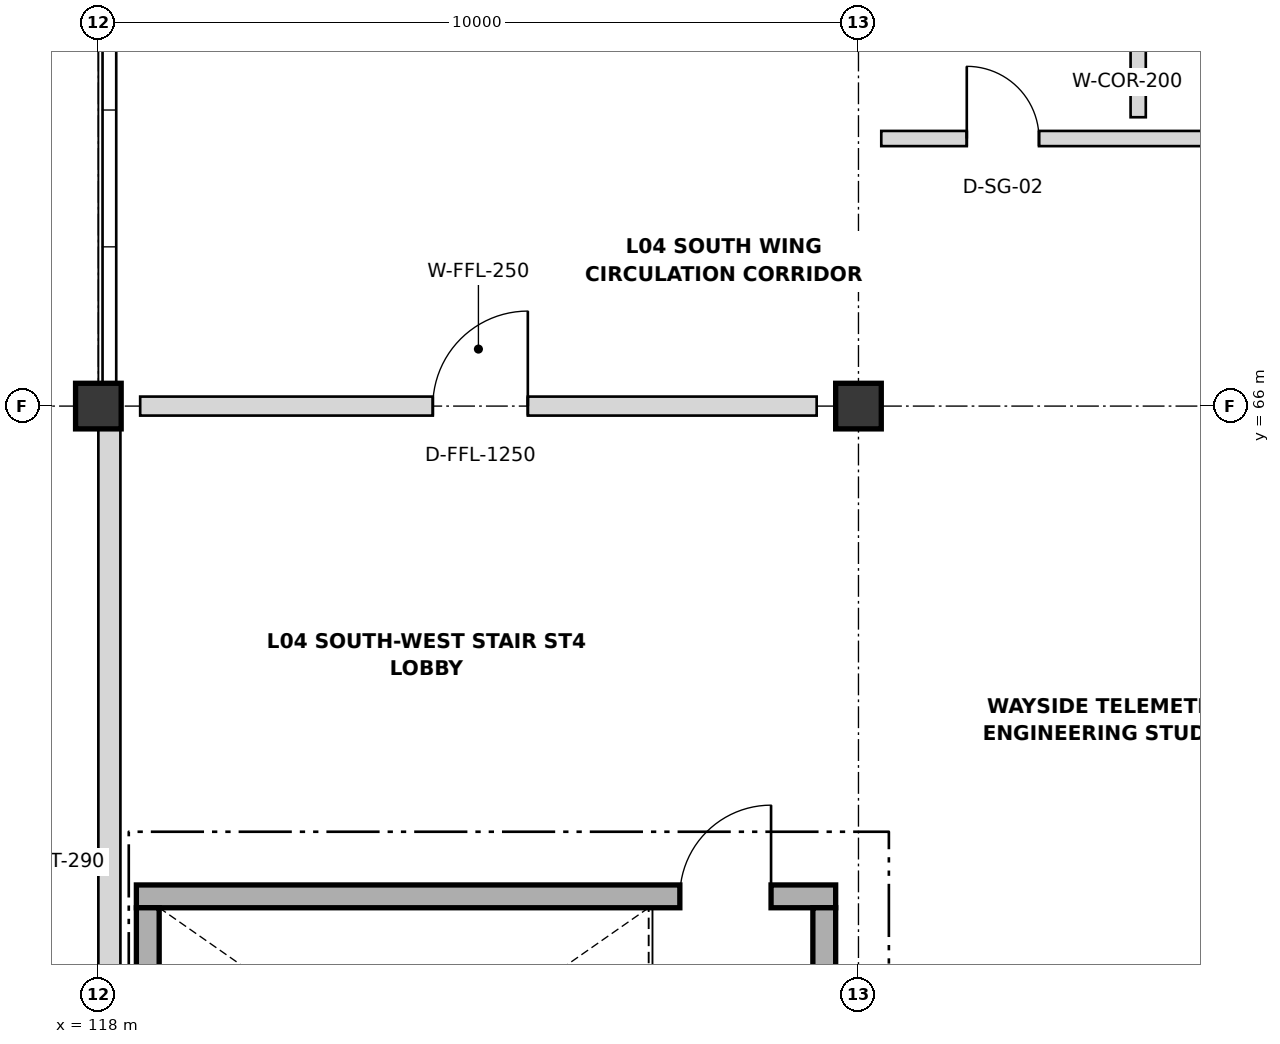
"""IFC4 building model, lengths in metres.
Left out: names, types, materials, properties, quantities, classifications, styles, units other than length and angle.
Written with IfcOpenShell. Run it as: python <this file> out.ifc"""

import sys

from ifc_helpers import new_model, si_unit, direction, frame, frame_2d, origin, origin_2d, place, context, subcontext, project, spatial, rectangle, extrude, element, fill, save


model = new_model("IFC4")
c1 = context("Model", 3, precision=1e-05, world=origin(), true_north=direction((0.0, 1.0)))
c2 = subcontext(c1, "Body", "Model", "MODEL_VIEW")
j1 = project(units=[si_unit("LENGTHUNIT", "METRE"), si_unit("PLANEANGLEUNIT", "RADIAN")], contexts=[c1])
p1 = place(None, origin())
s1 = spatial("IfcSite", under=j1, at=p1, CompositionType="ELEMENT")
p2 = place(p1, origin())
s2 = spatial("IfcBuilding", under=s1, at=p2, CompositionType="ELEMENT")
p3 = place(p2, frame((0.0, 0.0, 18.6)))
s3 = spatial("IfcBuildingStorey", under=s2, at=p3, CompositionType="ELEMENT", Elevation=18.6)
for number, where, z_axis, x_axis in (
    (1, (118.0, 66.0, 0.0), (0.0, 0.0, 1.0), (1.0, 0.0, 0.0)),
    (2, (128.0, 66.0, 0.0), (0.0, 0.0, 1.0), (1.0, 0.0, 0.0)),
):
    element("IfcColumn", number, at=place(p3, frame(where, z_axis=z_axis, x_axis=x_axis)), inside=s3, PredefinedType="COLUMN", context=c2, shape_type="SweptSolid", body=[
        extrude(rectangle(XDim=0.6, YDim=0.6, at=origin_2d()), origin(), (0.0, 0.0, 1.0), 4.2),
    ])
p4 = place(p3, frame((118.145, 54.295, 0.0), z_axis=(0.0, 0.0, 1.0), x_axis=(0.0, 1.0, 0.0)))
e3 = element("IfcWall", 3, at=p4, inside=s3, PredefinedType="SOLIDWALL", context=c2, shape_type="SweptSolid", body=[
    extrude(rectangle(XDim=11.41, YDim=0.29, at=frame_2d((5.705, 0.0))), origin(), (0.0, 0.0, 1.0), 3.188),
])
p5 = place(p3, frame((118.5, 59.55, 0.0), z_axis=(0.0, 0.0, 1.0), x_axis=(1.0, 0.0, 0.0)))
e4 = element("IfcWall", 4, at=p5, inside=s3, PredefinedType="SHEAR", context=c2, shape_type="SweptSolid", body=[
    extrude(rectangle(XDim=9.2, YDim=0.3, at=frame_2d((4.6, 0.0))), origin(), (0.0, 0.0, 1.0), 3.95),
])
p6 = place(p5, frame((7.15, 0.0, 0.0)))
e5 = element("IfcOpeningElement", 5, at=p6, cuts=e4, PredefinedType="OPENING", context=c2, shape_type="SweptSolid", body=[
    extrude(rectangle(XDim=1.2, YDim=2.15, at=frame_2d((0.6, 1.075))), frame((0.0, 0.16, 0.0), z_axis=(0.0, -1.0, 0.0), x_axis=(1.0, 0.0, 0.0)), (0.0, 0.0, 1.0), 0.32),
])
for number, where, z_axis, x_axis in (
    (6, (127.55, 59.4, 0.0), (0.0, 0.0, 1.0), (0.0, -1.0, 0.0)),
    (7, (118.65, 54.9, 0.0), (0.0, 0.0, 1.0), (0.0, 1.0, 0.0)),
):
    element("IfcWall", number, at=place(p3, frame(where, z_axis=z_axis, x_axis=x_axis)), inside=s3, PredefinedType="SHEAR", context=c2, shape_type="SweptSolid", body=[
        extrude(rectangle(XDim=4.5, YDim=0.3, at=frame_2d((2.25, 0.0))), origin(), (0.0, 0.0, 1.0), 3.95),
    ])
p7 = place(p3, frame((118.55, 66.0, 0.0), z_axis=(0.0, 0.0, 1.0), x_axis=(1.0, 0.0, 0.0)))
e8 = element("IfcWall", 8, at=p7, inside=s3, PredefinedType="PARTITIONING", context=c2, shape_type="SweptSolid", body=[
    extrude(rectangle(XDim=8.9, YDim=0.25, at=frame_2d((4.45, 0.0))), origin(), (0.0, 0.0, 1.0), 3.288),
])
p8 = place(p7, frame((3.85, 0.0, 0.0)))
e9 = element("IfcOpeningElement", 9, at=p8, cuts=e8, PredefinedType="OPENING", context=c2, shape_type="SweptSolid", body=[
    extrude(rectangle(XDim=1.25, YDim=2.15, at=frame_2d((0.625, 1.075))), frame((0.0, 0.135, 0.0), z_axis=(0.0, -1.0, 0.0), x_axis=(1.0, 0.0, 0.0)), (0.0, 0.0, 1.0), 0.27),
])
p9 = place(p3, frame((128.3, 69.52, 0.0), z_axis=(0.0, 0.0, 1.0), x_axis=(1.0, 0.0, 0.0)))
e10 = element("IfcWall", 10, at=p9, inside=s3, PredefinedType="PARTITIONING", context=c2, shape_type="SweptSolid", body=[
    extrude(rectangle(XDim=9.4, YDim=0.2, at=frame_2d((4.7, 0.0))), origin(), (0.0, 0.0, 1.0), 3.188),
])
p10 = place(p9, frame((1.125, 0.0, 0.0)))
e11 = element("IfcOpeningElement", 11, at=p10, cuts=e10, PredefinedType="OPENING", context=c2, shape_type="SweptSolid", body=[
    extrude(rectangle(XDim=0.95, YDim=2.1, at=frame_2d((0.475, 1.05))), frame((0.0, 0.11, 0.0), z_axis=(0.0, -1.0, 0.0), x_axis=(1.0, 0.0, 0.0)), (0.0, 0.0, 1.0), 0.22),
])
p11 = place(p3, frame((131.68, 69.8, 0.0), z_axis=(0.0, 0.0, 1.0), x_axis=(0.0, 1.0, 0.0)))
e12 = element("IfcWall", 12, at=p11, inside=s3, PredefinedType="PARTITIONING", context=c2, shape_type="SweptSolid", body=[
    extrude(rectangle(XDim=7.9, YDim=0.2, at=frame_2d((3.95, 0.0))), origin(), (0.0, 0.0, 1.0), 3.288),
])
p12 = place(p11, frame((3.2, 0.0, 0.0)))
e13 = element("IfcOpeningElement", 13, at=p12, cuts=e12, PredefinedType="OPENING", context=c2, shape_type="SweptSolid", body=[
    extrude(rectangle(XDim=1.0, YDim=2.1, at=frame_2d((0.5, 1.05))), frame((0.0, 0.11, 0.0), z_axis=(0.0, -1.0, 0.0), x_axis=(1.0, 0.0, 0.0)), (0.0, 0.0, 1.0), 0.22),
])
p13 = place(p6, origin())
e14 = element("IfcDoor", 14, at=p13, inside=s3, OperationType="SINGLE_SWING_RIGHT", PredefinedType="DOOR", context=c2, shape_type="SweptSolid", body=[
    extrude(rectangle(XDim=1.2, YDim=2.15, at=frame_2d((0.6, 1.075))), frame((0.0, 0.025, 0.0), z_axis=(0.0, -1.0, 0.0), x_axis=(1.0, 0.0, 0.0)), (0.0, 0.0, 1.0), 0.05),
])
fill(e5, e14)
p14 = place(p8, origin())
e15 = element("IfcDoor", 15, at=p14, inside=s3, OperationType="SINGLE_SWING_RIGHT", PredefinedType="DOOR", context=c2, shape_type="SweptSolid", body=[
    extrude(rectangle(XDim=1.25, YDim=2.15, at=frame_2d((0.625, 1.075))), frame((0.0, 0.025, 0.0), z_axis=(0.0, -1.0, 0.0), x_axis=(1.0, 0.0, 0.0)), (0.0, 0.0, 1.0), 0.05),
])
fill(e9, e15)
p15 = place(p10, origin())
e16 = element("IfcDoor", 16, at=p15, inside=s3, OperationType="SINGLE_SWING_LEFT", PredefinedType="DOOR", context=c2, shape_type="SweptSolid", body=[
    extrude(rectangle(XDim=0.95, YDim=2.1, at=frame_2d((0.475, 1.05))), frame((0.0, 0.025, 0.0), z_axis=(0.0, -1.0, 0.0), x_axis=(1.0, 0.0, 0.0)), (0.0, 0.0, 1.0), 0.05),
])
fill(e11, e16)
save(model, sys.argv[1])
